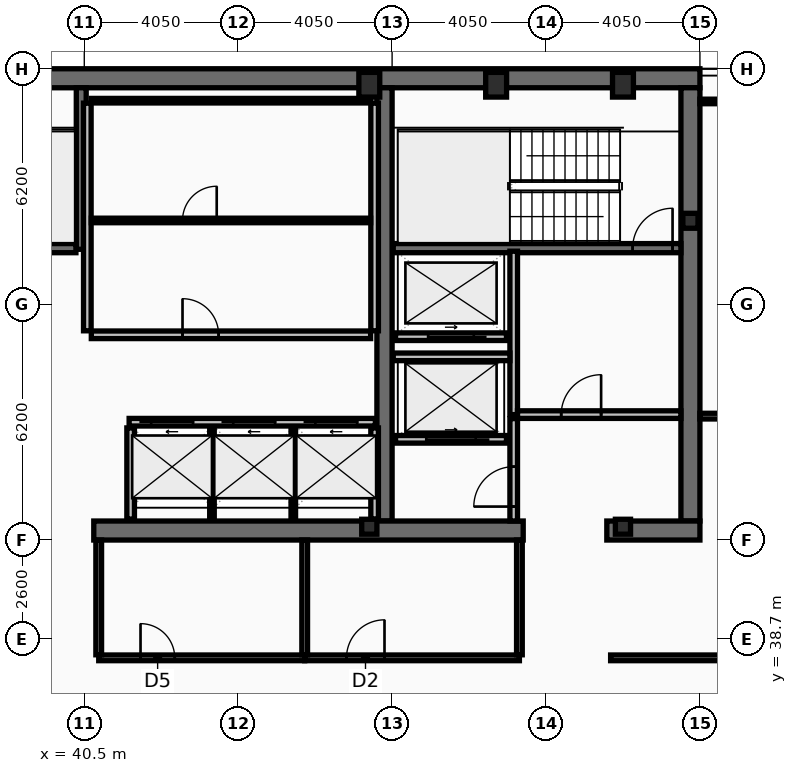
"""IFC4 building model, lengths in metres.
Left out: names, types, materials, properties, quantities, classifications, styles, units other than length and angle.
Written with IfcOpenShell. Run it as: python <this file> out.ifc"""

import sys

from ifc_helpers import new_model, si_unit, direction, frame, frame_2d, origin, origin_2d, place, context, subcontext, project, spatial, rectangle, hollow_rectangle, i_section, extrude, element, fill, save


model = new_model("IFC4")
c1 = context("Model", 3, precision=1e-05, world=origin(), true_north=direction((0.0, 1.0)))
c2 = subcontext(c1, "Body", "Model", "MODEL_VIEW")
j1 = project(units=[si_unit("LENGTHUNIT", "METRE"), si_unit("PLANEANGLEUNIT", "RADIAN")], contexts=[c1])
p1 = place(None, origin())
s1 = spatial("IfcSite", under=j1, at=p1, CompositionType="ELEMENT")
p2 = place(p1, origin())
s2 = spatial("IfcBuilding", under=s1, at=p2, CompositionType="ELEMENT")
p3 = place(p2, frame((0.0, 0.0, 318.2)))
s3 = spatial("IfcBuildingStorey", under=s2, at=p3, CompositionType="ELEMENT", Elevation=318.2)
p4 = place(p3, frame((16.2, 53.45, 0.0), z_axis=(0.0, 0.0, 1.0), x_axis=(1.0, 0.0, 0.0)))
e1 = element("IfcWall", 1, at=p4, inside=s3, PredefinedType="SHEAR", context=c2, shape_type="SweptSolid", body=[
    extrude(rectangle(XDim=40.5, YDim=0.5, at=frame_2d((20.25, 0.0))), origin(), (0.0, 0.0, 1.0), 3.44),
])
p5 = place(p3, frame((56.45, 53.2, 0.0), z_axis=(0.0, 0.0, 1.0), x_axis=(0.0, -1.0, 0.0)))
e2 = element("IfcWall", 2, at=p5, inside=s3, PredefinedType="SHEAR", context=c2, shape_type="SweptSolid", body=[
    extrude(rectangle(XDim=11.4, YDim=0.5, at=frame_2d((5.7, 0.0))), origin(), (0.0, 0.0, 1.0), 3.44),
])
p6 = place(p3, frame((48.4, 41.8, 0.0), z_axis=(0.0, 0.0, 1.0), x_axis=(0.0, 1.0, 0.0)))
e3 = element("IfcWall", 3, at=p6, inside=s3, PredefinedType="SHEAR", context=c2, shape_type="SweptSolid", body=[
    extrude(rectangle(XDim=11.4, YDim=0.4, at=frame_2d((5.7, 0.0))), origin(), (0.0, 0.0, 1.0), 3.44),
])
p7 = place(p3, frame((52.05, 41.55, 0.0), z_axis=(0.0, 0.0, 1.0), x_axis=(-1.0, 0.0, 0.0)))
e4 = element("IfcWall", 4, at=p7, inside=s3, PredefinedType="SHEAR", context=c2, shape_type="SweptSolid", body=[
    extrude(rectangle(XDim=11.3, YDim=0.5, at=frame_2d((5.65, 0.0))), origin(), (0.0, 0.0, 1.0), 3.44),
])
p8 = place(p3, frame((56.7, 41.55, 0.0), z_axis=(0.0, 0.0, 1.0), x_axis=(-1.0, 0.0, 0.0)))
e5 = element("IfcWall", 5, at=p8, inside=s3, PredefinedType="SHEAR", context=c2, shape_type="SweptSolid", body=[
    extrude(rectangle(XDim=2.45, YDim=0.5, at=frame_2d((1.225, 0.0))), origin(), (0.0, 0.0, 1.0), 3.44),
])
p9 = place(p3, frame((40.42, 48.95, 0.0), z_axis=(0.0, 0.0, 1.0), x_axis=(0.0, 1.0, 0.0)))
e6 = element("IfcWall", 6, at=p9, inside=s3, PredefinedType="SHEAR", context=c2, shape_type="SweptSolid", body=[
    extrude(rectangle(XDim=4.25, YDim=0.26, at=frame_2d((2.125, 0.0))), origin(), (0.0, 0.0, 1.0), 3.44),
])
p10 = place(p3, frame((48.63, 48.98, 0.0), z_axis=(0.0, 0.0, 1.0), x_axis=(1.0, 0.0, 0.0)))
e7 = element("IfcWall", 7, at=p10, inside=s3, PredefinedType="SHEAR", context=c2, shape_type="SweptSolid", body=[
    extrude(rectangle(XDim=7.57, YDim=0.24, at=frame_2d((3.785, 0.0))), origin(), (0.0, 0.0, 1.0), 3.44),
])
p11 = place(p10, frame((6.3, 0.0, 0.0)))
e8 = element("IfcOpeningElement", 8, at=p11, cuts=e7, PredefinedType="OPENING", context=c2, shape_type="SweptSolid", body=[
    extrude(rectangle(XDim=1.05, YDim=2.15, at=frame_2d((0.525, 1.075))), frame((0.0, 0.13, 0.0), z_axis=(0.0, -1.0, 0.0), x_axis=(1.0, 0.0, 0.0)), (0.0, 0.0, 1.0), 0.26),
])
p12 = place(p3, frame((32.72, 48.98, 0.0), z_axis=(0.0, 0.0, 1.0), x_axis=(1.0, 0.0, 0.0)))
e9 = element("IfcWall", 9, at=p12, inside=s3, PredefinedType="SHEAR", context=c2, shape_type="SweptSolid", body=[
    extrude(rectangle(XDim=7.56, YDim=0.24, at=frame_2d((3.78, 0.0))), origin(), (0.0, 0.0, 1.0), 3.44),
])
p13 = place(p12, frame((0.22, 0.0, 0.0)))
e10 = element("IfcOpeningElement", 10, at=p13, cuts=e9, PredefinedType="OPENING", context=c2, shape_type="SweptSolid", body=[
    extrude(rectangle(XDim=1.05, YDim=2.15, at=frame_2d((0.525, 1.075))), frame((0.0, 0.13, 0.0), z_axis=(0.0, -1.0, 0.0), x_axis=(1.0, 0.0, 0.0)), (0.0, 0.0, 1.0), 0.26),
])
for number, where, z_axis, x_axis in (
    (11, (48.0, 53.28, 0.0), (0.0, 0.0, 1.0), (1.0, 0.0, 0.0)),
    (12, (51.337, 53.28, 0.0), (0.0, 0.0, 1.0), (1.0, 0.0, 0.0)),
    (13, (54.675, 53.28, 0.0), (0.0, 0.0, 1.0), (1.0, 0.0, 0.0)),
):
    element("IfcColumn", number, at=place(p3, frame(where, z_axis=z_axis, x_axis=x_axis)), inside=s3, PredefinedType="COLUMN", context=c2, shape_type="SweptSolid", body=[
        extrude(hollow_rectangle(XDim=0.55, YDim=0.65, WallThickness=0.04, at=origin_2d()), origin(), (0.0, 0.0, 1.0), 3.6),
    ])
for number, where, z_axis, x_axis in (
    (14, (56.45, 49.7, 0.0), (0.0, 0.0, 1.0), (1.0, 0.0, 0.0)),
    (15, (48.0, 41.65, 0.0), (0.0, 0.0, 1.0), (1.0, 0.0, 0.0)),
    (16, (54.675, 41.65, 0.0), (0.0, 0.0, 1.0), (1.0, 0.0, 0.0)),
):
    element("IfcColumn", number, at=place(p3, frame(where, z_axis=z_axis, x_axis=x_axis)), inside=s3, PredefinedType="COLUMN", context=c2, shape_type="SweptSolid", body=[
        extrude(i_section(OverallWidth=0.399, OverallDepth=0.393, WebThickness=0.023, FlangeThickness=0.037, at=origin_2d()), origin(), (0.0, 0.0, 1.0), 3.6),
    ])
p14 = place(p3, frame((41.68, 44.4, 0.0), z_axis=(0.0, 0.0, 1.0), x_axis=(1.0, 0.0, 0.0)))
e17 = element("IfcWall", 17, at=p14, inside=s3, PredefinedType="PARTITIONING", context=c2, shape_type="SweptSolid", body=[
    extrude(rectangle(XDim=6.48, YDim=0.2, at=frame_2d((3.24, 0.0))), origin(), (0.0, 0.0, 1.0), 3.44),
])
p15 = place(p14, frame((0.58, 0.0, 0.0)))
e18 = element("IfcOpeningElement", 18, at=p15, cuts=e17, PredefinedType="OPENING", context=c2, shape_type="SweptSolid", body=[
    extrude(rectangle(XDim=1.1, YDim=2.18, at=frame_2d((0.55, 1.09))), frame((0.0, 0.11, 0.0), z_axis=(0.0, -1.0, 0.0), x_axis=(1.0, 0.0, 0.0)), (0.0, 0.0, 1.0), 0.22),
])
p16 = place(p14, frame((2.74, 0.0, 0.0)))
e19 = element("IfcOpeningElement", 19, at=p16, cuts=e17, PredefinedType="OPENING", context=c2, shape_type="SweptSolid", body=[
    extrude(rectangle(XDim=1.1, YDim=2.18, at=frame_2d((0.55, 1.09))), frame((0.0, 0.11, 0.0), z_axis=(0.0, -1.0, 0.0), x_axis=(1.0, 0.0, 0.0)), (0.0, 0.0, 1.0), 0.22),
])
p17 = place(p14, frame((4.9, 0.0, 0.0)))
e20 = element("IfcOpeningElement", 20, at=p17, cuts=e17, PredefinedType="OPENING", context=c2, shape_type="SweptSolid", body=[
    extrude(rectangle(XDim=1.1, YDim=2.18, at=frame_2d((0.55, 1.09))), frame((0.0, 0.11, 0.0), z_axis=(0.0, -1.0, 0.0), x_axis=(1.0, 0.0, 0.0)), (0.0, 0.0, 1.0), 0.22),
])
p18 = place(p3, frame((51.61, 43.95, 0.0), z_axis=(0.0, 0.0, 1.0), x_axis=(-1.0, 0.0, 0.0)))
e21 = element("IfcWall", 21, at=p18, inside=s3, PredefinedType="PARTITIONING", context=c2, shape_type="SweptSolid", body=[
    extrude(rectangle(XDim=2.92, YDim=0.2, at=frame_2d((1.46, 0.0))), origin(), (0.0, 0.0, 1.0), 3.44),
])
p19 = place(p18, frame((0.81, 0.0, 0.0)))
e22 = element("IfcOpeningElement", 22, at=p19, cuts=e21, PredefinedType="OPENING", context=c2, shape_type="SweptSolid", body=[
    extrude(rectangle(XDim=1.3, YDim=2.18, at=frame_2d((0.65, 1.09))), frame((0.0, 0.11, 0.0), z_axis=(0.0, -1.0, 0.0), x_axis=(1.0, 0.0, 0.0)), (0.0, 0.0, 1.0), 0.22),
])
p20 = place(p3, frame((51.61, 46.65, 0.0), z_axis=(0.0, 0.0, 1.0), x_axis=(-1.0, 0.0, 0.0)))
e23 = element("IfcWall", 23, at=p20, inside=s3, PredefinedType="PARTITIONING", context=c2, shape_type="SweptSolid", body=[
    extrude(rectangle(XDim=2.92, YDim=0.2, at=frame_2d((1.46, 0.0))), origin(), (0.0, 0.0, 1.0), 3.44),
])
p21 = place(p20, frame((0.86, 0.0, 0.0)))
e24 = element("IfcOpeningElement", 24, at=p21, cuts=e23, PredefinedType="OPENING", context=c2, shape_type="SweptSolid", body=[
    extrude(rectangle(XDim=1.2, YDim=2.18, at=frame_2d((0.6, 1.09))), frame((0.0, 0.11, 0.0), z_axis=(0.0, -1.0, 0.0), x_axis=(1.0, 0.0, 0.0)), (0.0, 0.0, 1.0), 0.22),
])
p22 = place(p3, frame((51.8, 44.6, 0.0), z_axis=(0.0, 0.0, 1.0), x_axis=(0.0, 1.0, 0.0)))
e25 = element("IfcWall", 25, at=p22, inside=s3, PredefinedType="PARTITIONING", context=c2, shape_type="SweptSolid", body=[
    extrude(rectangle(XDim=4.3, YDim=0.2, at=frame_2d((2.15, 0.0))), origin(), (0.0, 0.0, 1.0), 3.44),
])
p23 = place(p3, frame((51.9, 44.6, 0.0), z_axis=(0.0, 0.0, 1.0), x_axis=(1.0, 0.0, 0.0)))
e26 = element("IfcWall", 26, at=p23, inside=s3, PredefinedType="PARTITIONING", context=c2, shape_type="SweptSolid", body=[
    extrude(rectangle(XDim=4.3, YDim=0.2, at=frame_2d((2.15, 0.0))), origin(), (0.0, 0.0, 1.0), 3.44),
])
p24 = place(p23, frame((1.15, 0.0, 0.0)))
e27 = element("IfcOpeningElement", 27, at=p24, cuts=e26, PredefinedType="OPENING", context=c2, shape_type="SweptSolid", body=[
    extrude(rectangle(XDim=1.05, YDim=2.15, at=frame_2d((0.525, 1.075))), frame((0.0, 0.11, 0.0), z_axis=(0.0, -1.0, 0.0), x_axis=(1.0, 0.0, 0.0)), (0.0, 0.0, 1.0), 0.22),
])
p25 = place(p3, frame((48.63, 46.12, 0.0), z_axis=(0.0, 0.0, 1.0), x_axis=(1.0, 0.0, 0.0)))
e28 = element("IfcWall", 28, at=p25, inside=s3, PredefinedType="PARTITIONING", context=c2, shape_type="SweptSolid", body=[
    extrude(rectangle(XDim=3.07, YDim=0.2, at=frame_2d((1.535, 0.0))), origin(), (0.0, 0.0, 1.0), 3.44),
])
p26 = place(p3, frame((51.8, 41.8, 0.0), z_axis=(0.0, 0.0, 1.0), x_axis=(0.0, 1.0, 0.0)))
e29 = element("IfcWall", 29, at=p26, inside=s3, PredefinedType="PARTITIONING", context=c2, shape_type="SweptSolid", body=[
    extrude(rectangle(XDim=2.695, YDim=0.2, at=frame_2d((1.348, 0.0))), origin(), (0.0, 0.0, 1.0), 3.44),
])
p27 = place(p26, frame((0.38, 0.0, 0.0)))
e30 = element("IfcOpeningElement", 30, at=p27, cuts=e29, PredefinedType="OPENING", context=c2, shape_type="SweptSolid", body=[
    extrude(rectangle(XDim=1.05, YDim=2.15, at=frame_2d((0.525, 1.075))), frame((0.0, 0.11, 0.0), z_axis=(0.0, -1.0, 0.0), x_axis=(1.0, 0.0, 0.0)), (0.0, 0.0, 1.0), 0.22),
])
for number, where, z_axis, x_axis in (
    (31, (40.58, 46.805, 0.0), (0.0, 0.0, 1.0), (0.0, 1.0, 0.0)),
    (32, (48.14, 46.805, 0.0), (0.0, 0.0, 1.0), (0.0, 1.0, 0.0)),
):
    element("IfcWall", number, at=place(p3, frame(where, z_axis=z_axis, x_axis=x_axis)), inside=s3, PredefinedType="PARTITIONING", context=c2, shape_type="SweptSolid", body=[
        extrude(rectangle(XDim=5.99, YDim=0.2, at=frame_2d((2.995, 0.0))), origin(), (0.0, 0.0, 1.0), 3.44),
    ])
p28 = place(p3, frame((40.685, 52.86, 0.0), z_axis=(0.0, 0.0, 1.0), x_axis=(1.0, 0.0, 0.0)))
e33 = element("IfcWall", 33, at=p28, inside=s3, PredefinedType="PARTITIONING", context=c2, shape_type="SweptSolid", body=[
    extrude(rectangle(XDim=7.35, YDim=0.12, at=frame_2d((3.675, 0.0))), origin(), (0.0, 0.0, 1.0), 3.44),
])
p29 = place(p3, frame((40.685, 49.709, 0.0), z_axis=(0.0, 0.0, 1.0), x_axis=(1.0, 0.0, 0.0)))
e34 = element("IfcWall", 34, at=p29, inside=s3, PredefinedType="PARTITIONING", context=c2, shape_type="SweptSolid", body=[
    extrude(rectangle(XDim=7.35, YDim=0.12, at=frame_2d((3.675, 0.0))), origin(), (0.0, 0.0, 1.0), 3.44),
])
p30 = place(p29, frame((2.4, 0.0, 0.0)))
e35 = element("IfcOpeningElement", 35, at=p30, cuts=e34, PredefinedType="OPENING", context=c2, shape_type="SweptSolid", body=[
    extrude(rectangle(XDim=0.9, YDim=2.05, at=frame_2d((0.45, 1.025))), frame((0.0, 0.07, 0.0), z_axis=(0.0, -1.0, 0.0), x_axis=(1.0, 0.0, 0.0)), (0.0, 0.0, 1.0), 0.14),
])
p31 = place(p3, frame((40.685, 46.7, 0.0), z_axis=(0.0, 0.0, 1.0), x_axis=(1.0, 0.0, 0.0)))
e36 = element("IfcWall", 36, at=p31, inside=s3, PredefinedType="PARTITIONING", context=c2, shape_type="SweptSolid", body=[
    extrude(rectangle(XDim=7.35, YDim=0.2, at=frame_2d((3.675, 0.0))), origin(), (0.0, 0.0, 1.0), 3.44),
])
p32 = place(p31, frame((2.4, 0.0, 0.0)))
e37 = element("IfcOpeningElement", 37, at=p32, cuts=e36, PredefinedType="OPENING", context=c2, shape_type="SweptSolid", body=[
    extrude(rectangle(XDim=0.95, YDim=2.1, at=frame_2d((0.475, 1.05))), frame((0.0, 0.11, 0.0), z_axis=(0.0, -1.0, 0.0), x_axis=(1.0, 0.0, 0.0)), (0.0, 0.0, 1.0), 0.22),
])
for number, where, z_axis, x_axis in (
    (38, (41.72, 41.85, 0.0), (0.0, 0.0, 1.0), (0.0, 1.0, 0.0)),
    (39, (48.14, 41.85, 0.0), (0.0, 0.0, 1.0), (0.0, 1.0, 0.0)),
):
    element("IfcWall", number, at=place(p3, frame(where, z_axis=z_axis, x_axis=x_axis)), inside=s3, PredefinedType="PARTITIONING", context=c2, shape_type="SweptSolid", body=[
        extrude(rectangle(XDim=2.4, YDim=0.2, at=frame_2d((1.2, 0.0))), origin(), (0.0, 0.0, 1.0), 3.44),
    ])
for number, where, z_axis, x_axis in (
    (40, (43.86, 41.85, 0.0), (0.0, 0.0, 1.0), (0.0, 1.0, 0.0)),
    (41, (46.0, 41.85, 0.0), (0.0, 0.0, 1.0), (0.0, 1.0, 0.0)),
):
    element("IfcWall", number, at=place(p3, frame(where, z_axis=z_axis, x_axis=x_axis)), inside=s3, PredefinedType="PARTITIONING", context=c2, shape_type="SweptSolid", body=[
        extrude(rectangle(XDim=2.4, YDim=0.12, at=frame_2d((1.2, 0.0))), origin(), (0.0, 0.0, 1.0), 3.44),
    ])
p33 = place(p3, frame((40.88, 38.2, 0.0), z_axis=(0.0, 0.0, 1.0), x_axis=(1.0, 0.0, 0.0)))
e42 = element("IfcWall", 42, at=p33, inside=s3, PredefinedType="PARTITIONING", context=c2, shape_type="SweptSolid", body=[
    extrude(rectangle(XDim=5.42, YDim=0.15, at=frame_2d((2.71, 0.0))), origin(), (0.0, 0.0, 1.0), 3.44),
])
p34 = place(p33, frame((1.1, 0.0, 0.0)))
e43 = element("IfcOpeningElement", 43, at=p34, cuts=e42, PredefinedType="OPENING", context=c2, shape_type="SweptSolid", body=[
    extrude(rectangle(XDim=0.9, YDim=2.05, at=frame_2d((0.45, 1.025))), frame((0.0, 0.085, 0.0), z_axis=(0.0, -1.0, 0.0), x_axis=(1.0, 0.0, 0.0)), (0.0, 0.0, 1.0), 0.17),
])
p35 = place(p3, frame((46.3, 38.2, 0.0), z_axis=(0.0, 0.0, 1.0), x_axis=(1.0, 0.0, 0.0)))
e44 = element("IfcWall", 44, at=p35, inside=s3, PredefinedType="PARTITIONING", context=c2, shape_type="SweptSolid", body=[
    extrude(rectangle(XDim=5.65, YDim=0.15, at=frame_2d((2.825, 0.0))), origin(), (0.0, 0.0, 1.0), 2.83),
])
p36 = place(p35, frame((1.1, 0.0, 0.0)))
e45 = element("IfcOpeningElement", 45, at=p36, cuts=e44, PredefinedType="OPENING", context=c2, shape_type="SweptSolid", body=[
    extrude(rectangle(XDim=1.0, YDim=2.05, at=frame_2d((0.5, 1.025))), frame((0.0, 0.085, 0.0), z_axis=(0.0, -1.0, 0.0), x_axis=(1.0, 0.0, 0.0)), (0.0, 0.0, 1.0), 0.17),
])
for number, where, z_axis, x_axis in (
    (46, (40.88, 38.28, 0.0), (0.0, 0.0, 1.0), (0.0, 1.0, 0.0)),
    (47, (46.3, 38.28, 0.0), (0.0, 0.0, 1.0), (0.0, 1.0, 0.0)),
    (48, (51.95, 38.28, 0.0), (0.0, 0.0, 1.0), (0.0, 1.0, 0.0)),
):
    element("IfcWall", number, at=place(p3, frame(where, z_axis=z_axis, x_axis=x_axis)), inside=s3, PredefinedType="PARTITIONING", context=c2, shape_type="SweptSolid", body=[
        extrude(rectangle(XDim=3.02, YDim=0.15, at=frame_2d((1.51, 0.0))), origin(), (0.0, 0.0, 1.0), 3.44),
    ])
p37 = place(p3, frame((54.35, 38.2, 0.0), z_axis=(0.0, 0.0, 1.0), x_axis=(1.0, 0.0, 0.0)))
e49 = element("IfcWall", 49, at=p37, inside=s3, PredefinedType="PARTITIONING", context=c2, shape_type="SweptSolid", body=[
    extrude(rectangle(XDim=6.52, YDim=0.15, at=frame_2d((3.26, 0.0))), origin(), (0.0, 0.0, 1.0), 2.83),
])
p38 = place(p37, frame((3.25, 0.0, 0.0)))
e50 = element("IfcOpeningElement", 50, at=p38, cuts=e49, PredefinedType="OPENING", context=c2, shape_type="SweptSolid", body=[
    extrude(rectangle(XDim=0.95, YDim=2.05, at=frame_2d((0.475, 1.025))), frame((0.0, 0.085, 0.0), z_axis=(0.0, -1.0, 0.0), x_axis=(1.0, 0.0, 0.0)), (0.0, 0.0, 1.0), 0.17),
])
p39 = place(p3, frame((56.7, 44.56, 0.0), z_axis=(0.0, 0.0, 1.0), x_axis=(1.0, 0.0, 0.0)))
e51 = element("IfcWall", 51, at=p39, inside=s3, PredefinedType="PARTITIONING", context=c2, shape_type="SweptSolid", body=[
    extrude(rectangle(XDim=4.105, YDim=0.15, at=frame_2d((2.052, 0.0))), origin(), (0.0, 0.0, 1.0), 2.88),
])
p40 = place(p39, frame((0.9, 0.0, 0.0)))
e52 = element("IfcOpeningElement", 52, at=p40, cuts=e51, PredefinedType="OPENING", context=c2, shape_type="SweptSolid", body=[
    extrude(rectangle(XDim=0.9, YDim=2.05, at=frame_2d((0.45, 1.025))), frame((0.0, 0.085, 0.0), z_axis=(0.0, -1.0, 0.0), x_axis=(1.0, 0.0, 0.0)), (0.0, 0.0, 1.0), 0.17),
])
p41 = place(p3, frame((56.7, 52.84, 0.0), z_axis=(0.0, 0.0, 1.0), x_axis=(1.0, 0.0, 0.0)))
e53 = element("IfcWall", 53, at=p41, inside=s3, PredefinedType="PARTITIONING", context=c2, shape_type="SweptSolid", body=[
    extrude(rectangle(XDim=4.105, YDim=0.12, at=frame_2d((2.052, 0.0))), origin(), (0.0, 0.0, 1.0), 3.44),
])
p42 = place(p11, origin())
e54 = element("IfcDoor", 54, at=p42, inside=s3, OperationType="SINGLE_SWING_RIGHT", PredefinedType="DOOR", context=c2, shape_type="SweptSolid", body=[
    extrude(rectangle(XDim=1.05, YDim=2.15, at=frame_2d((0.525, 1.075))), frame((0.0, 0.025, 0.0), z_axis=(0.0, -1.0, 0.0), x_axis=(1.0, 0.0, 0.0)), (0.0, 0.0, 1.0), 0.05),
])
fill(e8, e54)
p43 = place(p15, origin())
e55 = element("IfcDoor", 55, at=p43, inside=s3, OperationType="SLIDING_TO_LEFT", PredefinedType="DOOR", context=c2, shape_type="SweptSolid", body=[
    extrude(rectangle(XDim=1.1, YDim=2.18, at=frame_2d((0.55, 1.09))), frame((0.0, 0.025, 0.0), z_axis=(0.0, -1.0, 0.0), x_axis=(1.0, 0.0, 0.0)), (0.0, 0.0, 1.0), 0.05),
])
fill(e18, e55)
p44 = place(p16, origin())
e56 = element("IfcDoor", 56, at=p44, inside=s3, OperationType="SLIDING_TO_LEFT", PredefinedType="DOOR", context=c2, shape_type="SweptSolid", body=[
    extrude(rectangle(XDim=1.1, YDim=2.18, at=frame_2d((0.55, 1.09))), frame((0.0, 0.025, 0.0), z_axis=(0.0, -1.0, 0.0), x_axis=(1.0, 0.0, 0.0)), (0.0, 0.0, 1.0), 0.05),
])
fill(e19, e56)
p45 = place(p17, origin())
e57 = element("IfcDoor", 57, at=p45, inside=s3, OperationType="SLIDING_TO_LEFT", PredefinedType="DOOR", context=c2, shape_type="SweptSolid", body=[
    extrude(rectangle(XDim=1.1, YDim=2.18, at=frame_2d((0.55, 1.09))), frame((0.0, 0.025, 0.0), z_axis=(0.0, -1.0, 0.0), x_axis=(1.0, 0.0, 0.0)), (0.0, 0.0, 1.0), 0.05),
])
fill(e20, e57)
p46 = place(p19, origin())
e58 = element("IfcDoor", 58, at=p46, inside=s3, OperationType="SLIDING_TO_LEFT", PredefinedType="DOOR", context=c2, shape_type="SweptSolid", body=[
    extrude(rectangle(XDim=1.3, YDim=2.18, at=frame_2d((0.65, 1.09))), frame((0.0, 0.025, 0.0), z_axis=(0.0, -1.0, 0.0), x_axis=(1.0, 0.0, 0.0)), (0.0, 0.0, 1.0), 0.05),
])
fill(e22, e58)
p47 = place(p21, origin())
e59 = element("IfcDoor", 59, at=p47, inside=s3, OperationType="SLIDING_TO_LEFT", PredefinedType="DOOR", context=c2, shape_type="SweptSolid", body=[
    extrude(rectangle(XDim=1.2, YDim=2.18, at=frame_2d((0.6, 1.09))), frame((0.0, 0.025, 0.0), z_axis=(0.0, -1.0, 0.0), x_axis=(1.0, 0.0, 0.0)), (0.0, 0.0, 1.0), 0.05),
])
fill(e24, e59)
p48 = place(p24, origin())
e60 = element("IfcDoor", 60, at=p48, inside=s3, OperationType="SINGLE_SWING_RIGHT", PredefinedType="DOOR", context=c2, shape_type="SweptSolid", body=[
    extrude(rectangle(XDim=1.05, YDim=2.15, at=frame_2d((0.525, 1.075))), frame((0.0, 0.025, 0.0), z_axis=(0.0, -1.0, 0.0), x_axis=(1.0, 0.0, 0.0)), (0.0, 0.0, 1.0), 0.05),
])
fill(e27, e60)
p49 = place(p27, origin())
e61 = element("IfcDoor", 61, at=p49, inside=s3, OperationType="SINGLE_SWING_LEFT", PredefinedType="DOOR", context=c2, shape_type="SweptSolid", body=[
    extrude(rectangle(XDim=1.05, YDim=2.15, at=frame_2d((0.525, 1.075))), frame((0.0, 0.025, 0.0), z_axis=(0.0, -1.0, 0.0), x_axis=(1.0, 0.0, 0.0)), (0.0, 0.0, 1.0), 0.05),
])
fill(e30, e61)
p50 = place(p30, origin())
e62 = element("IfcDoor", 62, at=p50, inside=s3, OperationType="SINGLE_SWING_RIGHT", PredefinedType="DOOR", context=c2, shape_type="SweptSolid", body=[
    extrude(rectangle(XDim=0.9, YDim=2.05, at=frame_2d((0.45, 1.025))), frame((0.0, 0.025, 0.0), z_axis=(0.0, -1.0, 0.0), x_axis=(1.0, 0.0, 0.0)), (0.0, 0.0, 1.0), 0.05),
])
fill(e35, e62)
p51 = place(p32, origin())
e63 = element("IfcDoor", 63, at=p51, inside=s3, OperationType="SINGLE_SWING_LEFT", PredefinedType="DOOR", context=c2, shape_type="SweptSolid", body=[
    extrude(rectangle(XDim=0.95, YDim=2.1, at=frame_2d((0.475, 1.05))), frame((0.0, 0.025, 0.0), z_axis=(0.0, -1.0, 0.0), x_axis=(1.0, 0.0, 0.0)), (0.0, 0.0, 1.0), 0.05),
])
fill(e37, e63)
p52 = place(p34, origin())
e64 = element("IfcDoor", 64, at=p52, inside=s3, OperationType="SINGLE_SWING_LEFT", PredefinedType="DOOR", context=c2, shape_type="SweptSolid", body=[
    extrude(rectangle(XDim=0.9, YDim=2.05, at=frame_2d((0.45, 1.025))), frame((0.0, 0.025, 0.0), z_axis=(0.0, -1.0, 0.0), x_axis=(1.0, 0.0, 0.0)), (0.0, 0.0, 1.0), 0.05),
])
fill(e43, e64)
p53 = place(p36, origin())
e65 = element("IfcDoor", 65, at=p53, inside=s3, OperationType="SINGLE_SWING_RIGHT", PredefinedType="DOOR", context=c2, shape_type="SweptSolid", body=[
    extrude(rectangle(XDim=1.0, YDim=2.05, at=frame_2d((0.5, 1.025))), frame((0.0, 0.025, 0.0), z_axis=(0.0, -1.0, 0.0), x_axis=(1.0, 0.0, 0.0)), (0.0, 0.0, 1.0), 0.05),
])
fill(e45, e65)
save(model, sys.argv[1])
